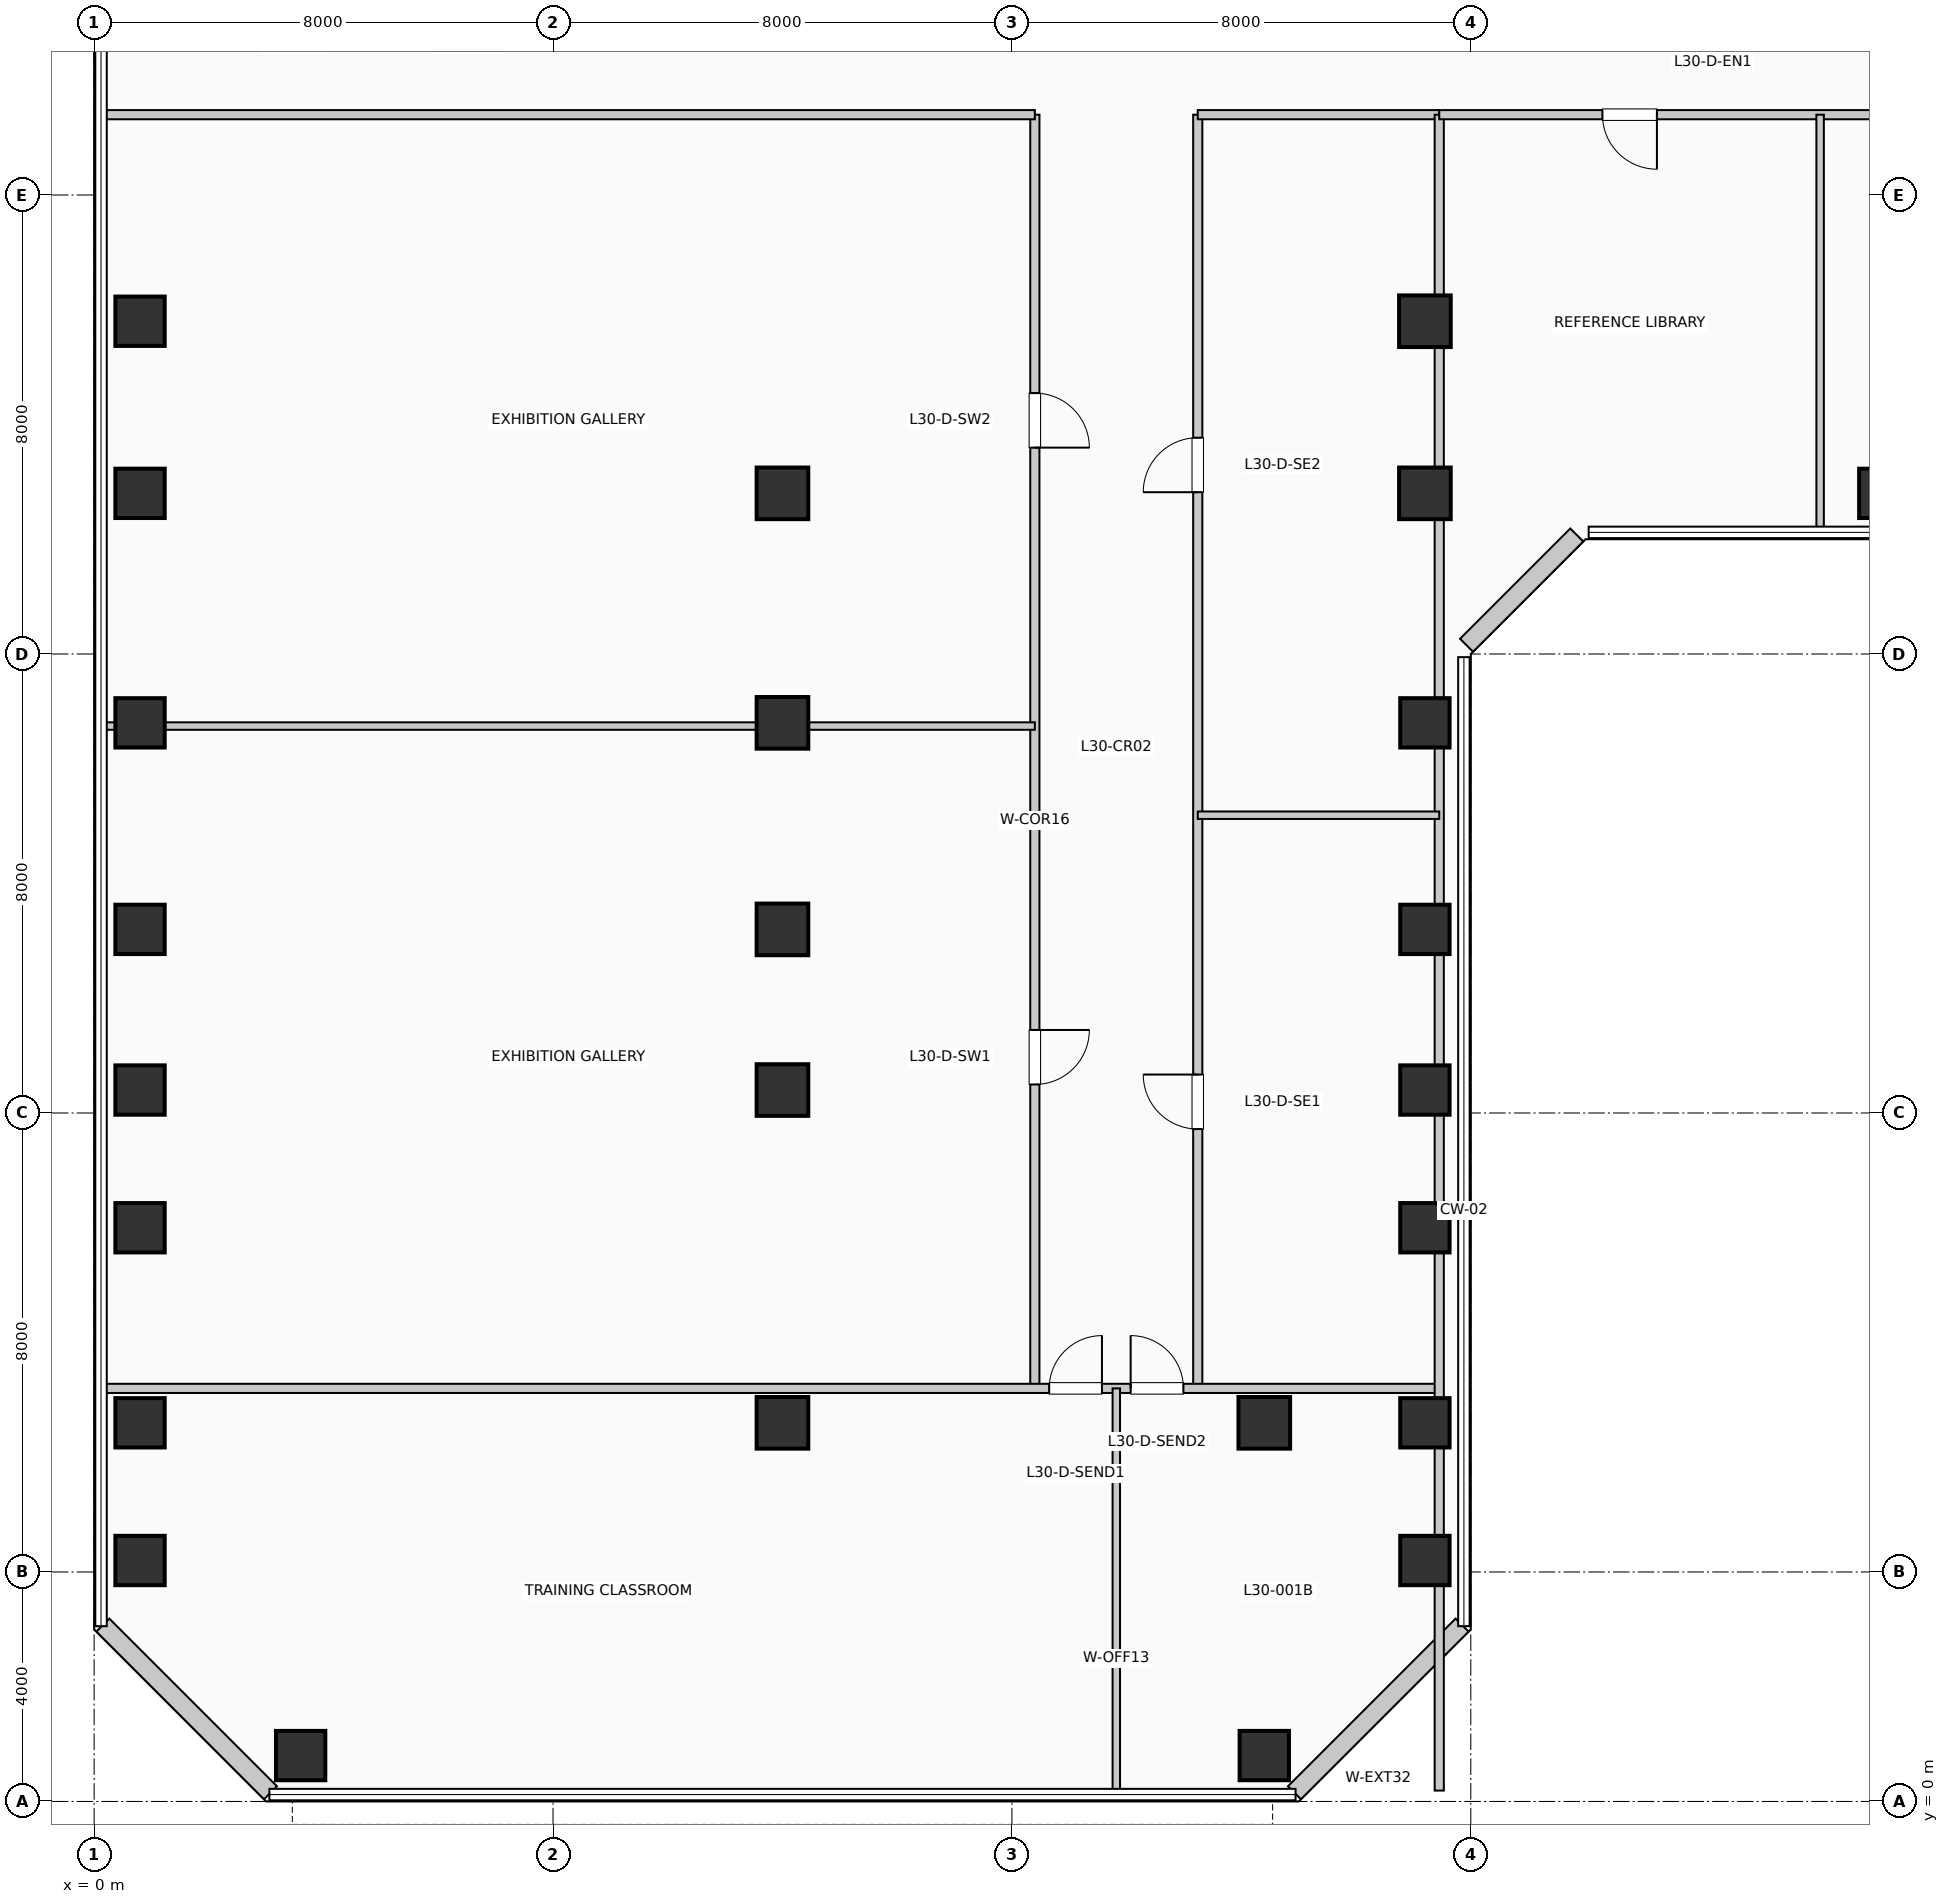
"""IFC4 building model, lengths in metres.
Left out: names, types, materials, properties, quantities, classifications, styles, units other than length and angle.
Written with IfcOpenShell. Run it as: python <this file> out.ifc"""

import sys

from ifc_helpers import new_model, si_unit, direction, frame, frame_2d, origin, origin_2d, place, context, subcontext, project, spatial, rectangle, extrude, element, fill, save


model = new_model("IFC4")
c1 = context("Model", 3, precision=1e-05, world=origin(), true_north=direction((0.0, 1.0)))
c2 = subcontext(c1, "Body", "Model", "MODEL_VIEW")
j1 = project(units=[si_unit("LENGTHUNIT", "METRE"), si_unit("PLANEANGLEUNIT", "RADIAN")], contexts=[c1])
p1 = place(None, origin())
s1 = spatial("IfcSite", under=j1, at=p1, CompositionType="ELEMENT")
p2 = place(p1, origin())
s2 = spatial("IfcBuilding", under=s1, at=p2, CompositionType="ELEMENT")
p3 = place(p2, frame((0.0, 0.0, 126.39)))
s3 = spatial("IfcBuildingStorey", under=s2, at=p3, CompositionType="ELEMENT", Elevation=126.39)
for number, where, z_axis, x_axis in (
    (1, (0.8, 4.2, 0.0), (0.0, 0.0, 1.0), (1.0, 0.0, 0.0)),
    (2, (0.8, 6.6, 0.0), (0.0, 0.0, 1.0), (1.0, 0.0, 0.0)),
    (3, (0.8, 10.0, 0.0), (0.0, 0.0, 1.0), (1.0, 0.0, 0.0)),
    (4, (0.8, 12.4, 0.0), (0.0, 0.0, 1.0), (1.0, 0.0, 0.0)),
    (5, (0.8, 15.2, 0.0), (0.0, 0.0, 1.0), (1.0, 0.0, 0.0)),
    (6, (0.8, 18.8, 0.0), (0.0, 0.0, 1.0), (1.0, 0.0, 0.0)),
    (7, (0.8, 22.8, 0.0), (0.0, 0.0, 1.0), (1.0, 0.0, 0.0)),
    (8, (0.8, 25.8, 0.0), (0.0, 0.0, 1.0), (1.0, 0.0, 0.0)),
    (9, (3.6, 0.8, 0.0), (0.0, 0.0, 1.0), (1.0, 0.0, 0.0)),
):
    element("IfcColumn", number, at=place(p3, frame(where, z_axis=z_axis, x_axis=x_axis)), inside=s3, PredefinedType="COLUMN", context=c2, shape_type="SweptSolid", body=[
        extrude(rectangle(XDim=0.86, YDim=0.86, at=origin_2d()), origin(), (0.0, 0.0, 1.0), 3.96),
    ])
for number, where, z_axis, x_axis in (
    (10, (12.0, 6.6, 0.0), (0.0, 0.0, 1.0), (1.0, 0.0, 0.0)),
    (11, (12.0, 12.4, 0.0), (0.0, 0.0, 1.0), (1.0, 0.0, 0.0)),
    (12, (12.0, 15.2, 0.0), (0.0, 0.0, 1.0), (1.0, 0.0, 0.0)),
    (13, (12.0, 18.8, 0.0), (0.0, 0.0, 1.0), (1.0, 0.0, 0.0)),
    (14, (12.0, 22.8, 0.0), (0.0, 0.0, 1.0), (1.0, 0.0, 0.0)),
):
    element("IfcColumn", number, at=place(p3, frame(where, z_axis=z_axis, x_axis=x_axis)), inside=s3, PredefinedType="COLUMN", context=c2, shape_type="SweptSolid", body=[
        extrude(rectangle(XDim=0.9, YDim=0.9, at=origin_2d()), origin(), (0.0, 0.0, 1.0), 3.96),
    ])
p4 = place(p3, frame((20.4, 0.8, 0.0), z_axis=(0.0, 0.0, 1.0), x_axis=(1.0, 0.0, 0.0)))
e15 = element("IfcColumn", 15, at=p4, inside=s3, PredefinedType="COLUMN", context=c2, shape_type="SweptSolid", body=[
    extrude(rectangle(XDim=0.86, YDim=0.86, at=origin_2d()), origin(), (0.0, 0.0, 1.0), 3.96),
])
p5 = place(p3, frame((20.4, 6.6, 0.0), z_axis=(0.0, 0.0, 1.0), x_axis=(1.0, 0.0, 0.0)))
e16 = element("IfcColumn", 16, at=p5, inside=s3, PredefinedType="COLUMN", context=c2, shape_type="SweptSolid", body=[
    extrude(rectangle(XDim=0.9, YDim=0.9, at=origin_2d()), origin(), (0.0, 0.0, 1.0), 3.96),
])
for number, where, z_axis, x_axis in (
    (17, (23.2, 4.2, 0.0), (0.0, 0.0, 1.0), (1.0, 0.0, 0.0)),
    (18, (23.2, 6.6, 0.0), (0.0, 0.0, 1.0), (1.0, 0.0, 0.0)),
    (19, (23.2, 10.0, 0.0), (0.0, 0.0, 1.0), (1.0, 0.0, 0.0)),
    (20, (23.2, 12.4, 0.0), (0.0, 0.0, 1.0), (1.0, 0.0, 0.0)),
    (21, (23.2, 15.2, 0.0), (0.0, 0.0, 1.0), (1.0, 0.0, 0.0)),
    (22, (23.2, 18.8, 0.0), (0.0, 0.0, 1.0), (1.0, 0.0, 0.0)),
):
    element("IfcColumn", number, at=place(p3, frame(where, z_axis=z_axis, x_axis=x_axis)), inside=s3, PredefinedType="COLUMN", context=c2, shape_type="SweptSolid", body=[
        extrude(rectangle(XDim=0.86, YDim=0.86, at=origin_2d()), origin(), (0.0, 0.0, 1.0), 3.96),
    ])
for number, where, z_axis, x_axis in (
    (23, (23.2, 22.8, 0.0), (0.0, 0.0, 1.0), (1.0, 0.0, 0.0)),
    (24, (23.2, 25.8, 0.0), (0.0, 0.0, 1.0), (1.0, 0.0, 0.0)),
):
    element("IfcColumn", number, at=place(p3, frame(where, z_axis=z_axis, x_axis=x_axis)), inside=s3, PredefinedType="COLUMN", context=c2, shape_type="SweptSolid", body=[
        extrude(rectangle(XDim=0.9, YDim=0.9, at=origin_2d()), origin(), (0.0, 0.0, 1.0), 3.96),
    ])
p6 = place(p3, frame((31.2, 22.8, 0.0), z_axis=(0.0, 0.0, 1.0), x_axis=(1.0, 0.0, 0.0)))
e25 = element("IfcColumn", 25, at=p6, inside=s3, PredefinedType="COLUMN", context=c2, shape_type="SweptSolid", body=[
    extrude(rectangle(XDim=0.86, YDim=0.86, at=origin_2d()), origin(), (0.0, 0.0, 1.0), 3.96),
])
p7 = place(p3, frame((20.926, 0.152, 0.0), z_axis=(0.0, 0.0, 1.0), x_axis=(0.707106781187, 0.707106781187, 0.0)))
e26 = element("IfcWall", 26, at=p7, inside=s3, PredefinedType="SOLIDWALL", context=c2, shape_type="SweptSolid", body=[
    extrude(rectangle(XDim=4.133, YDim=0.32, at=frame_2d((2.066, 0.0))), origin(), (0.0, 0.0, 1.0), 3.71),
])
p8 = place(p3, frame((23.926, 20.152, 0.0), z_axis=(0.0, 0.0, 1.0), x_axis=(0.707106781187, 0.707106781187, 0.0)))
e27 = element("IfcWall", 27, at=p8, inside=s3, PredefinedType="SOLIDWALL", context=c2, shape_type="SweptSolid", body=[
    extrude(rectangle(XDim=2.718, YDim=0.32, at=frame_2d((1.359, 0.0))), origin(), (0.0, 0.0, 1.0), 3.71),
])
p9 = place(p3, frame((0.152, 3.074, 0.0), z_axis=(0.0, 0.0, 1.0), x_axis=(0.707106781187, -0.707106781187, 0.0)))
e28 = element("IfcWall", 28, at=p9, inside=s3, PredefinedType="SOLIDWALL", context=c2, shape_type="SweptSolid", body=[
    extrude(rectangle(XDim=4.133, YDim=0.32, at=frame_2d((2.066, 0.0))), origin(), (0.0, 0.0, 1.0), 3.71),
])
p10 = place(p3, frame((16.4, 7.2, 0.0), z_axis=(0.0, 0.0, 1.0), x_axis=(0.0, 1.0, 0.0)))
e29 = element("IfcWall", 29, at=p10, inside=s3, PredefinedType="PARTITIONING", context=c2, shape_type="SweptSolid", body=[
    extrude(rectangle(XDim=22.2, YDim=0.16, at=frame_2d((11.1, 0.0))), origin(), (0.0, 0.0, 1.0), 3.71),
])
p11 = place(p10, frame((6.247, 0.0, 0.0), z_axis=(0.0, 0.0, 1.0), x_axis=(-1.0, 0.0, 0.0)))
e30 = element("IfcOpeningElement", 30, at=p11, cuts=e29, PredefinedType="OPENING", context=c2, shape_type="SweptSolid", body=[
    extrude(rectangle(XDim=0.95, YDim=2.15, at=frame_2d((0.475, 1.075))), frame((0.0, 0.09, 0.0), z_axis=(0.0, -1.0, 0.0), x_axis=(1.0, 0.0, 0.0)), (0.0, 0.0, 1.0), 0.18),
])
p12 = place(p10, frame((17.347, 0.0, 0.0), z_axis=(0.0, 0.0, 1.0), x_axis=(-1.0, 0.0, 0.0)))
e31 = element("IfcOpeningElement", 31, at=p12, cuts=e29, PredefinedType="OPENING", context=c2, shape_type="SweptSolid", body=[
    extrude(rectangle(XDim=0.95, YDim=2.15, at=frame_2d((0.475, 1.075))), frame((0.0, 0.09, 0.0), z_axis=(0.0, -1.0, 0.0), x_axis=(1.0, 0.0, 0.0)), (0.0, 0.0, 1.0), 0.18),
])
p13 = place(p3, frame((19.24, 7.2, 0.0), z_axis=(0.0, 0.0, 1.0), x_axis=(0.0, 1.0, 0.0)))
e32 = element("IfcWall", 32, at=p13, inside=s3, PredefinedType="PARTITIONING", context=c2, shape_type="SweptSolid", body=[
    extrude(rectangle(XDim=22.2, YDim=0.16, at=frame_2d((11.1, 0.0))), origin(), (0.0, 0.0, 1.0), 3.71),
])
p14 = place(p13, frame((4.52, 0.0, 0.0)))
e33 = element("IfcOpeningElement", 33, at=p14, cuts=e32, PredefinedType="OPENING", context=c2, shape_type="SweptSolid", body=[
    extrude(rectangle(XDim=0.95, YDim=2.15, at=frame_2d((0.475, 1.075))), frame((0.0, 0.09, 0.0), z_axis=(0.0, -1.0, 0.0), x_axis=(1.0, 0.0, 0.0)), (0.0, 0.0, 1.0), 0.18),
])
p15 = place(p13, frame((15.62, 0.0, 0.0)))
e34 = element("IfcOpeningElement", 34, at=p15, cuts=e32, PredefinedType="OPENING", context=c2, shape_type="SweptSolid", body=[
    extrude(rectangle(XDim=0.95, YDim=2.15, at=frame_2d((0.475, 1.075))), frame((0.0, 0.09, 0.0), z_axis=(0.0, -1.0, 0.0), x_axis=(1.0, 0.0, 0.0)), (0.0, 0.0, 1.0), 0.18),
])
p16 = place(p3, frame((0.19, 7.2, 0.0), z_axis=(0.0, 0.0, 1.0), x_axis=(1.0, 0.0, 0.0)))
e35 = element("IfcWall", 35, at=p16, inside=s3, PredefinedType="PARTITIONING", context=c2, shape_type="SweptSolid", body=[
    extrude(rectangle(XDim=23.26, YDim=0.16, at=frame_2d((11.63, 0.0))), origin(), (0.0, 0.0, 1.0), 3.71),
])
p17 = place(p16, frame((16.46, 0.0, 0.0)))
e36 = element("IfcOpeningElement", 36, at=p17, cuts=e35, PredefinedType="OPENING", context=c2, shape_type="SweptSolid", body=[
    extrude(rectangle(XDim=0.92, YDim=2.1, at=frame_2d((0.46, 1.05))), frame((0.0, 0.09, 0.0), z_axis=(0.0, -1.0, 0.0), x_axis=(1.0, 0.0, 0.0)), (0.0, 0.0, 1.0), 0.18),
])
p18 = place(p16, frame((17.88, 0.0, 0.0)))
e37 = element("IfcOpeningElement", 37, at=p18, cuts=e35, PredefinedType="OPENING", context=c2, shape_type="SweptSolid", body=[
    extrude(rectangle(XDim=0.92, YDim=2.1, at=frame_2d((0.46, 1.05))), frame((0.0, 0.09, 0.0), z_axis=(0.0, -1.0, 0.0), x_axis=(1.0, 0.0, 0.0)), (0.0, 0.0, 1.0), 0.18),
])
p19 = place(p3, frame((0.19, 29.4, 0.0), z_axis=(0.0, 0.0, 1.0), x_axis=(1.0, 0.0, 0.0)))
e38 = element("IfcWall", 38, at=p19, inside=s3, PredefinedType="PARTITIONING", context=c2, shape_type="SweptSolid", body=[
    extrude(rectangle(XDim=16.21, YDim=0.16, at=frame_2d((8.105, 0.0))), origin(), (0.0, 0.0, 1.0), 3.365),
])
p20 = place(p3, frame((19.24, 29.4, 0.0), z_axis=(0.0, 0.0, 1.0), x_axis=(1.0, 0.0, 0.0)))
e39 = element("IfcWall", 39, at=p20, inside=s3, PredefinedType="PARTITIONING", context=c2, shape_type="SweptSolid", body=[
    extrude(rectangle(XDim=4.21, YDim=0.16, at=frame_2d((2.105, 0.0))), origin(), (0.0, 0.0, 1.0), 3.71),
])
p21 = place(p3, frame((23.45, 0.19, 0.0), z_axis=(0.0, 0.0, 1.0), x_axis=(0.0, 1.0, 0.0)))
e40 = element("IfcWall", 40, at=p21, inside=s3, PredefinedType="PARTITIONING", context=c2, shape_type="SweptSolid", body=[
    extrude(rectangle(XDim=29.21, YDim=0.16, at=frame_2d((14.605, 0.0))), origin(), (0.0, 0.0, 1.0), 3.045),
])
p22 = place(p3, frame((17.82, 0.19, 0.0), z_axis=(0.0, 0.0, 1.0), x_axis=(0.0, 1.0, 0.0)))
e41 = element("IfcWall", 41, at=p22, inside=s3, PredefinedType="PARTITIONING", context=c2, shape_type="SweptSolid", body=[
    extrude(rectangle(XDim=7.01, YDim=0.13, at=frame_2d((3.505, 0.0))), origin(), (0.0, 0.0, 1.0), 3.71),
])
p23 = place(p3, frame((0.19, 18.744, 0.0), z_axis=(0.0, 0.0, 1.0), x_axis=(1.0, 0.0, 0.0)))
e42 = element("IfcWall", 42, at=p23, inside=s3, PredefinedType="PARTITIONING", context=c2, shape_type="SweptSolid", body=[
    extrude(rectangle(XDim=16.21, YDim=0.13, at=frame_2d((8.105, 0.0))), origin(), (0.0, 0.0, 1.0), 3.045),
])
p24 = place(p3, frame((19.24, 17.19, 0.0), z_axis=(0.0, 0.0, 1.0), x_axis=(1.0, 0.0, 0.0)))
e43 = element("IfcWall", 43, at=p24, inside=s3, PredefinedType="PARTITIONING", context=c2, shape_type="SweptSolid", body=[
    extrude(rectangle(XDim=4.21, YDim=0.13, at=frame_2d((2.105, 0.0))), origin(), (0.0, 0.0, 1.0), 3.71),
])
p25 = place(p3, frame((23.45, 29.4, 0.0), z_axis=(0.0, 0.0, 1.0), x_axis=(1.0, 0.0, 0.0)))
e44 = element("IfcWall", 44, at=p25, inside=s3, PredefinedType="PARTITIONING", context=c2, shape_type="SweptSolid", body=[
    extrude(rectangle(XDim=26.56, YDim=0.16, at=frame_2d((13.28, 0.0))), origin(), (0.0, 0.0, 1.0), 3.365),
])
p26 = place(p25, frame((3.795, 0.0, 0.0), z_axis=(0.0, 0.0, 1.0), x_axis=(-1.0, 0.0, 0.0)))
e45 = element("IfcOpeningElement", 45, at=p26, cuts=e44, PredefinedType="OPENING", context=c2, shape_type="SweptSolid", body=[
    extrude(rectangle(XDim=0.95, YDim=2.15, at=frame_2d((0.475, 1.075))), frame((0.0, 0.09, 0.0), z_axis=(0.0, -1.0, 0.0), x_axis=(1.0, 0.0, 0.0)), (0.0, 0.0, 1.0), 0.18),
])
p27 = place(p25, frame((11.099, 0.0, 0.0), z_axis=(0.0, 0.0, 1.0), x_axis=(-1.0, 0.0, 0.0)))
e46 = element("IfcOpeningElement", 46, at=p27, cuts=e44, PredefinedType="OPENING", context=c2, shape_type="SweptSolid", body=[
    extrude(rectangle(XDim=0.95, YDim=2.15, at=frame_2d((0.475, 1.075))), frame((0.0, 0.09, 0.0), z_axis=(0.0, -1.0, 0.0), x_axis=(1.0, 0.0, 0.0)), (0.0, 0.0, 1.0), 0.18),
])
p28 = place(p25, frame((21.059, 0.0, 0.0), z_axis=(0.0, 0.0, 1.0), x_axis=(-1.0, 0.0, 0.0)))
e47 = element("IfcOpeningElement", 47, at=p28, cuts=e44, PredefinedType="OPENING", context=c2, shape_type="SweptSolid", body=[
    extrude(rectangle(XDim=0.95, YDim=2.15, at=frame_2d((0.475, 1.075))), frame((0.0, 0.09, 0.0), z_axis=(0.0, -1.0, 0.0), x_axis=(1.0, 0.0, 0.0)), (0.0, 0.0, 1.0), 0.18),
])
p29 = place(p3, frame((30.09, 22.19, 0.0), z_axis=(0.0, 0.0, 1.0), x_axis=(0.0, 1.0, 0.0)))
e48 = element("IfcWall", 48, at=p29, inside=s3, PredefinedType="PARTITIONING", context=c2, shape_type="SweptSolid", body=[
    extrude(rectangle(XDim=7.21, YDim=0.13, at=frame_2d((3.605, 0.0))), origin(), (0.0, 0.0, 1.0), 3.71),
])
p30 = place(p17, origin())
e49 = element("IfcDoor", 49, at=p30, inside=s3, OperationType="SINGLE_SWING_RIGHT", PredefinedType="DOOR", context=c2, shape_type="SweptSolid", body=[
    extrude(rectangle(XDim=0.92, YDim=2.1, at=frame_2d((0.46, 1.05))), frame((0.0, 0.025, 0.0), z_axis=(0.0, -1.0, 0.0), x_axis=(1.0, 0.0, 0.0)), (0.0, 0.0, 1.0), 0.05),
])
fill(e36, e49)
p31 = place(p18, origin())
e50 = element("IfcDoor", 50, at=p31, inside=s3, OperationType="SINGLE_SWING_LEFT", PredefinedType="DOOR", context=c2, shape_type="SweptSolid", body=[
    extrude(rectangle(XDim=0.92, YDim=2.1, at=frame_2d((0.46, 1.05))), frame((0.0, 0.025, 0.0), z_axis=(0.0, -1.0, 0.0), x_axis=(1.0, 0.0, 0.0)), (0.0, 0.0, 1.0), 0.05),
])
fill(e37, e50)
p32 = place(p11, origin())
e51 = element("IfcDoor", 51, at=p32, inside=s3, OperationType="SINGLE_SWING_RIGHT", PredefinedType="DOOR", context=c2, shape_type="SweptSolid", body=[
    extrude(rectangle(XDim=0.95, YDim=2.15, at=frame_2d((0.475, 1.075))), frame((0.0, 0.025, 0.0), z_axis=(0.0, -1.0, 0.0), x_axis=(1.0, 0.0, 0.0)), (0.0, 0.0, 1.0), 0.05),
])
fill(e30, e51)
p33 = place(p12, origin())
e52 = element("IfcDoor", 52, at=p33, inside=s3, OperationType="SINGLE_SWING_LEFT", PredefinedType="DOOR", context=c2, shape_type="SweptSolid", body=[
    extrude(rectangle(XDim=0.95, YDim=2.15, at=frame_2d((0.475, 1.075))), frame((0.0, 0.025, 0.0), z_axis=(0.0, -1.0, 0.0), x_axis=(1.0, 0.0, 0.0)), (0.0, 0.0, 1.0), 0.05),
])
fill(e31, e52)
p34 = place(p14, origin())
e53 = element("IfcDoor", 53, at=p34, inside=s3, OperationType="SINGLE_SWING_RIGHT", PredefinedType="DOOR", context=c2, shape_type="SweptSolid", body=[
    extrude(rectangle(XDim=0.95, YDim=2.15, at=frame_2d((0.475, 1.075))), frame((0.0, 0.025, 0.0), z_axis=(0.0, -1.0, 0.0), x_axis=(1.0, 0.0, 0.0)), (0.0, 0.0, 1.0), 0.05),
])
fill(e33, e53)
p35 = place(p15, origin())
e54 = element("IfcDoor", 54, at=p35, inside=s3, OperationType="SINGLE_SWING_LEFT", PredefinedType="DOOR", context=c2, shape_type="SweptSolid", body=[
    extrude(rectangle(XDim=0.95, YDim=2.15, at=frame_2d((0.475, 1.075))), frame((0.0, 0.025, 0.0), z_axis=(0.0, -1.0, 0.0), x_axis=(1.0, 0.0, 0.0)), (0.0, 0.0, 1.0), 0.05),
])
fill(e34, e54)
p36 = place(p26, origin())
e55 = element("IfcDoor", 55, at=p36, inside=s3, OperationType="SINGLE_SWING_RIGHT", PredefinedType="DOOR", context=c2, shape_type="SweptSolid", body=[
    extrude(rectangle(XDim=0.95, YDim=2.15, at=frame_2d((0.475, 1.075))), frame((0.0, 0.025, 0.0), z_axis=(0.0, -1.0, 0.0), x_axis=(1.0, 0.0, 0.0)), (0.0, 0.0, 1.0), 0.05),
])
fill(e45, e55)
save(model, sys.argv[1])
